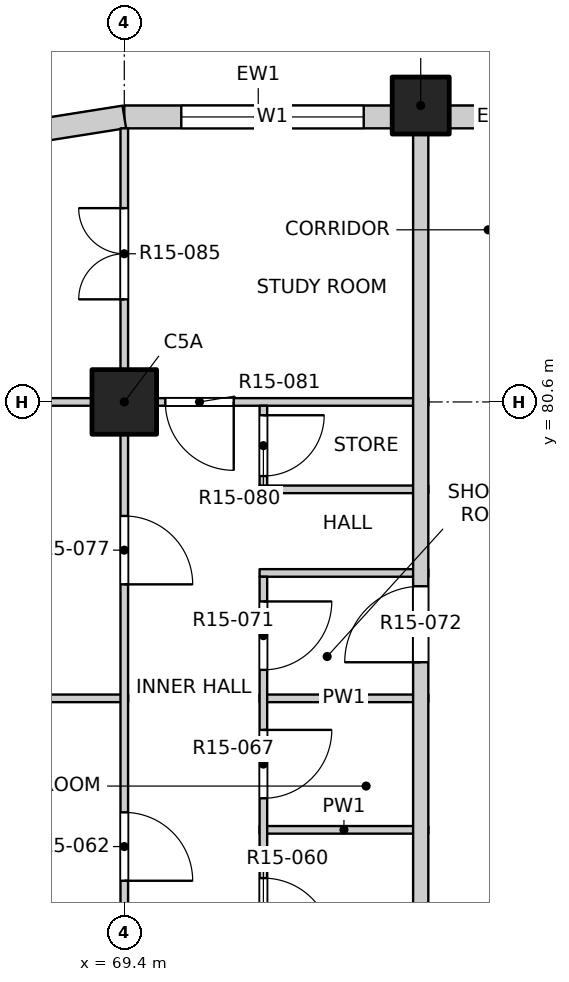
"""IFC4 building model, lengths in metres.
Left out: names, types, materials, properties, quantities, classifications, styles, units other than length and angle.
Written with IfcOpenShell. Run it as: python <this file> out.ifc"""

import sys

from ifc_helpers import new_model, si_unit, direction, frame, frame_2d, origin, origin_2d, place, context, subcontext, project, spatial, rectangle, extrude, element, fill, save


model = new_model("IFC4")
c1 = context("Model", 3, precision=1e-05, world=origin(), true_north=direction((0.0, 1.0)))
c2 = subcontext(c1, "Body", "Model", "MODEL_VIEW")
j1 = project(units=[si_unit("LENGTHUNIT", "METRE"), si_unit("PLANEANGLEUNIT", "RADIAN")], contexts=[c1])
p1 = place(None, origin())
s1 = spatial("IfcSite", under=j1, at=p1, CompositionType="ELEMENT")
p2 = place(p1, origin())
s2 = spatial("IfcBuilding", under=s1, at=p2, CompositionType="ELEMENT")
p3 = place(p2, frame((0.0, 0.0, 158.8)))
s3 = spatial("IfcBuildingStorey", under=s2, at=p3, CompositionType="ELEMENT", Elevation=158.8)
p4 = place(p3, frame((73.3, 84.5, -0.25), z_axis=(0.0, 0.0, 1.0), x_axis=(1.0, 0.0, 0.0)))
e1 = element("IfcColumn", 1, at=p4, inside=s3, PredefinedType="COLUMN", context=c2, shape_type="SweptSolid", body=[
    extrude(rectangle(XDim=0.75, YDim=0.75, at=origin_2d()), origin(), (0.0, 0.0, 1.0), 3.4),
])
p5 = place(p3, frame((69.4, 80.6, -0.25), z_axis=(0.0, 0.0, 1.0), x_axis=(1.0, 0.0, 0.0)))
e2 = element("IfcColumn", 2, at=p5, inside=s3, PredefinedType="COLUMN", context=c2, shape_type="SweptSolid", body=[
    extrude(rectangle(XDim=0.85, YDim=0.85, at=origin_2d()), origin(), (0.0, 0.0, 1.0), 3.4),
])
p6 = place(p3, frame((69.4, 84.35, 0.0), z_axis=(0.0, 0.0, 1.0), x_axis=(1.0, 0.0, 0.0)))
e3 = element("IfcWall", 3, at=p6, inside=s3, PredefinedType="SOLIDWALL", context=c2, shape_type="SweptSolid", body=[
    extrude(rectangle(XDim=3.525, YDim=0.3, at=frame_2d((1.763, 0.0))), origin(), (0.0, 0.0, 1.0), 2.7),
])
p7 = place(p6, frame((0.75, 0.0, 0.9)))
e4 = element("IfcOpeningElement", 4, at=p7, cuts=e3, PredefinedType="OPENING", context=c2, shape_type="SweptSolid", body=[
    extrude(rectangle(XDim=2.4, YDim=1.8, at=frame_2d((1.2, 0.9))), frame((0.0, 0.16, 0.0), z_axis=(0.0, -1.0, 0.0), x_axis=(1.0, 0.0, 0.0)), (0.0, 0.0, 1.0), 0.32),
])
p8 = place(p3, frame((73.675, 84.35, 0.0), z_axis=(0.0, 0.0, 1.0), x_axis=(1.0, 0.0, 0.0)))
e5 = element("IfcWall", 5, at=p8, inside=s3, PredefinedType="SOLIDWALL", context=c2, shape_type="SweptSolid", body=[
    extrude(rectangle(XDim=1.3, YDim=0.3, at=frame_2d((0.65, 0.0))), origin(), (0.0, 0.0, 1.0), 2.7),
])
p9 = place(p3, frame((69.4, 84.35, 0.0), z_axis=(0.0, 0.0, 1.0), x_axis=(-0.987678452879, -0.156496880861, 0.0)))
e6 = element("IfcWall", 6, at=p9, inside=s3, PredefinedType="SOLIDWALL", context=c2, shape_type="SweptSolid", body=[
    extrude(rectangle(XDim=1.173, YDim=0.3, at=frame_2d((0.586, 0.0))), origin(), (0.0, 0.0, 1.0), 2.7),
])
p10 = place(p3, frame((71.18, 74.97, 0.0), z_axis=(0.0, 0.0, 1.0), x_axis=(1.0, 0.0, 0.0)))
e7 = element("IfcWall", 7, at=p10, inside=s3, PredefinedType="PARTITIONING", context=c2, shape_type="SweptSolid", body=[
    extrude(rectangle(XDim=2.22, YDim=0.1, at=frame_2d((1.11, 0.0))), origin(), (0.0, 0.0, 1.0), 3.15),
])
p11 = place(p3, frame((65.8, 76.7, 0.0), z_axis=(0.0, 0.0, 1.0), x_axis=(1.0, 0.0, 0.0)))
e8 = element("IfcWall", 8, at=p11, inside=s3, PredefinedType="PARTITIONING", context=c2, shape_type="SweptSolid", body=[
    extrude(rectangle(XDim=3.65, YDim=0.1, at=frame_2d((1.825, 0.0))), origin(), (0.0, 0.0, 1.0), 2.55),
])
p12 = place(p3, frame((71.18, 76.7, 0.0), z_axis=(0.0, 0.0, 1.0), x_axis=(1.0, 0.0, 0.0)))
e9 = element("IfcWall", 9, at=p12, inside=s3, PredefinedType="PARTITIONING", context=c2, shape_type="SweptSolid", body=[
    extrude(rectangle(XDim=2.22, YDim=0.1, at=frame_2d((1.11, 0.0))), origin(), (0.0, 0.0, 1.0), 2.55),
])
for number, where, z_axis, x_axis in (
    (10, (71.18, 78.35, 0.0), (0.0, 0.0, 1.0), (1.0, 0.0, 0.0)),
    (11, (71.18, 79.45, 0.0), (0.0, 0.0, 1.0), (1.0, 0.0, 0.0)),
):
    element("IfcWall", number, at=place(p3, frame(where, z_axis=z_axis, x_axis=x_axis)), inside=s3, PredefinedType="PARTITIONING", context=c2, shape_type="SweptSolid", body=[
        extrude(rectangle(XDim=2.22, YDim=0.1, at=frame_2d((1.11, 0.0))), origin(), (0.0, 0.0, 1.0), 3.15),
    ])
p13 = place(p3, frame((65.8, 80.6, 0.0), z_axis=(0.0, 0.0, 1.0), x_axis=(1.0, 0.0, 0.0)))
e12 = element("IfcWall", 12, at=p13, inside=s3, PredefinedType="PARTITIONING", context=c2, shape_type="SweptSolid", body=[
    extrude(rectangle(XDim=7.6, YDim=0.1, at=frame_2d((3.8, 0.0))), origin(), (0.0, 0.0, 1.0), 3.15),
])
p14 = place(p13, frame((4.14, 0.0, 0.0)))
e13 = element("IfcOpeningElement", 13, at=p14, cuts=e12, PredefinedType="OPENING", context=c2, shape_type="SweptSolid", body=[
    extrude(rectangle(XDim=0.9, YDim=2.1, at=frame_2d((0.45, 1.05))), frame((0.0, 0.06, 0.0), z_axis=(0.0, -1.0, 0.0), x_axis=(1.0, 0.0, 0.0)), (0.0, 0.0, 1.0), 0.12),
])
p15 = place(p3, frame((69.4, 45.8, 0.0), z_axis=(0.0, 0.0, 1.0), x_axis=(0.0, 1.0, 0.0)))
e14 = element("IfcWall", 14, at=p15, inside=s3, PredefinedType="PARTITIONING", context=c2, shape_type="SweptSolid", body=[
    extrude(rectangle(XDim=38.4, YDim=0.1, at=frame_2d((19.2, 0.0))), origin(), (0.0, 0.0, 1.0), 3.15),
])
p16 = place(p15, frame((1.05, 0.0, 0.0)))
e15 = element("IfcOpeningElement", 15, at=p16, cuts=e14, PredefinedType="OPENING", context=c2, shape_type="SweptSolid", body=[
    extrude(rectangle(XDim=1.2, YDim=2.1, at=frame_2d((0.6, 1.05))), frame((0.0, 0.06, 0.0), z_axis=(0.0, -1.0, 0.0), x_axis=(1.0, 0.0, 0.0)), (0.0, 0.0, 1.0), 0.12),
])
p17 = place(p15, frame((5.1, 0.0, 0.0)))
e16 = element("IfcOpeningElement", 16, at=p17, cuts=e14, PredefinedType="OPENING", context=c2, shape_type="SweptSolid", body=[
    extrude(rectangle(XDim=0.9, YDim=2.1, at=frame_2d((0.45, 1.05))), frame((0.0, 0.06, 0.0), z_axis=(0.0, -1.0, 0.0), x_axis=(1.0, 0.0, 0.0)), (0.0, 0.0, 1.0), 0.12),
])
p18 = place(p15, frame((11.925, 0.0, 0.0)))
e17 = element("IfcOpeningElement", 17, at=p18, cuts=e14, PredefinedType="OPENING", context=c2, shape_type="SweptSolid", body=[
    extrude(rectangle(XDim=1.2, YDim=2.1, at=frame_2d((0.6, 1.05))), frame((0.0, 0.06, 0.0), z_axis=(0.0, -1.0, 0.0), x_axis=(1.0, 0.0, 0.0)), (0.0, 0.0, 1.0), 0.12),
])
p19 = place(p15, frame((16.8, 0.0, 0.0)))
e18 = element("IfcOpeningElement", 18, at=p19, cuts=e14, PredefinedType="OPENING", context=c2, shape_type="SweptSolid", body=[
    extrude(rectangle(XDim=0.9, YDim=2.1, at=frame_2d((0.45, 1.05))), frame((0.0, 0.06, 0.0), z_axis=(0.0, -1.0, 0.0), x_axis=(1.0, 0.0, 0.0)), (0.0, 0.0, 1.0), 0.12),
])
p20 = place(p15, frame((22.5, 0.0, 0.0)))
e19 = element("IfcOpeningElement", 19, at=p20, cuts=e14, PredefinedType="OPENING", context=c2, shape_type="SweptSolid", body=[
    extrude(rectangle(XDim=1.2, YDim=2.1, at=frame_2d((0.6, 1.05))), frame((0.0, 0.06, 0.0), z_axis=(0.0, -1.0, 0.0), x_axis=(1.0, 0.0, 0.0)), (0.0, 0.0, 1.0), 0.12),
])
p21 = place(p15, frame((28.5, 0.0, 0.0)))
e20 = element("IfcOpeningElement", 20, at=p21, cuts=e14, PredefinedType="OPENING", context=c2, shape_type="SweptSolid", body=[
    extrude(rectangle(XDim=0.9, YDim=2.1, at=frame_2d((0.45, 1.05))), frame((0.0, 0.06, 0.0), z_axis=(0.0, -1.0, 0.0), x_axis=(1.0, 0.0, 0.0)), (0.0, 0.0, 1.0), 0.12),
])
p22 = place(p15, frame((32.4, 0.0, 0.0)))
e21 = element("IfcOpeningElement", 21, at=p22, cuts=e14, PredefinedType="OPENING", context=c2, shape_type="SweptSolid", body=[
    extrude(rectangle(XDim=0.9, YDim=2.1, at=frame_2d((0.45, 1.05))), frame((0.0, 0.06, 0.0), z_axis=(0.0, -1.0, 0.0), x_axis=(1.0, 0.0, 0.0)), (0.0, 0.0, 1.0), 0.12),
])
p23 = place(p15, frame((36.15, 0.0, 0.0)))
e22 = element("IfcOpeningElement", 22, at=p23, cuts=e14, PredefinedType="OPENING", context=c2, shape_type="SweptSolid", body=[
    extrude(rectangle(XDim=1.2, YDim=2.1, at=frame_2d((0.6, 1.05))), frame((0.0, 0.06, 0.0), z_axis=(0.0, -1.0, 0.0), x_axis=(1.0, 0.0, 0.0)), (0.0, 0.0, 1.0), 0.12),
])
p24 = place(p3, frame((71.23, 68.45, 0.0), z_axis=(0.0, 0.0, 1.0), x_axis=(0.0, 1.0, 0.0)))
e23 = element("IfcWall", 23, at=p24, inside=s3, PredefinedType="PARTITIONING", context=c2, shape_type="SweptSolid", body=[
    extrude(rectangle(XDim=9.85, YDim=0.1, at=frame_2d((4.925, 0.0))), origin(), (0.0, 0.0, 1.0), 3.15),
])
p25 = place(p24, frame((0.625, 0.0, 0.0)))
e24 = element("IfcOpeningElement", 24, at=p25, cuts=e23, PredefinedType="OPENING", context=c2, shape_type="SweptSolid", body=[
    extrude(rectangle(XDim=0.9, YDim=2.1, at=frame_2d((0.45, 1.05))), frame((0.0, 0.06, 0.0), z_axis=(0.0, -1.0, 0.0), x_axis=(1.0, 0.0, 0.0)), (0.0, 0.0, 1.0), 0.12),
])
p26 = place(p24, frame((2.875, 0.0, 0.0)))
e25 = element("IfcOpeningElement", 25, at=p26, cuts=e23, PredefinedType="OPENING", context=c2, shape_type="SweptSolid", body=[
    extrude(rectangle(XDim=0.8, YDim=2.1, at=frame_2d((0.4, 1.05))), frame((0.0, 0.06, 0.0), z_axis=(0.0, -1.0, 0.0), x_axis=(1.0, 0.0, 0.0)), (0.0, 0.0, 1.0), 0.12),
])
p27 = place(p24, frame((4.985, 0.0, 0.0)))
e26 = element("IfcOpeningElement", 26, at=p27, cuts=e23, PredefinedType="OPENING", context=c2, shape_type="SweptSolid", body=[
    extrude(rectangle(XDim=0.9, YDim=2.1, at=frame_2d((0.45, 1.05))), frame((0.0, 0.06, 0.0), z_axis=(0.0, -1.0, 0.0), x_axis=(1.0, 0.0, 0.0)), (0.0, 0.0, 1.0), 0.12),
])
p28 = place(p24, frame((6.935, 0.0, 0.0)))
e27 = element("IfcOpeningElement", 27, at=p28, cuts=e23, PredefinedType="OPENING", context=c2, shape_type="SweptSolid", body=[
    extrude(rectangle(XDim=0.9, YDim=2.1, at=frame_2d((0.45, 1.05))), frame((0.0, 0.06, 0.0), z_axis=(0.0, -1.0, 0.0), x_axis=(1.0, 0.0, 0.0)), (0.0, 0.0, 1.0), 0.12),
])
p29 = place(p24, frame((8.625, 0.0, 0.0)))
e28 = element("IfcOpeningElement", 28, at=p29, cuts=e23, PredefinedType="OPENING", context=c2, shape_type="SweptSolid", body=[
    extrude(rectangle(XDim=0.9, YDim=2.1, at=frame_2d((0.45, 1.05))), frame((0.0, 0.06, 0.0), z_axis=(0.0, -1.0, 0.0), x_axis=(1.0, 0.0, 0.0)), (0.0, 0.0, 1.0), 0.12),
])
p30 = place(p3, frame((71.23, 79.5, 0.0), z_axis=(0.0, 0.0, 1.0), x_axis=(0.0, 1.0, 0.0)))
e29 = element("IfcWall", 29, at=p30, inside=s3, PredefinedType="PARTITIONING", context=c2, shape_type="SweptSolid", body=[
    extrude(rectangle(XDim=1.05, YDim=0.1, at=frame_2d((0.525, 0.0))), origin(), (0.0, 0.0, 1.0), 3.15),
])
p31 = place(p30, frame((0.125, 0.0, 0.0)))
e30 = element("IfcOpeningElement", 30, at=p31, cuts=e29, PredefinedType="OPENING", context=c2, shape_type="SweptSolid", body=[
    extrude(rectangle(XDim=0.8, YDim=2.1, at=frame_2d((0.4, 1.05))), frame((0.0, 0.06, 0.0), z_axis=(0.0, -1.0, 0.0), x_axis=(1.0, 0.0, 0.0)), (0.0, 0.0, 1.0), 0.12),
])
p32 = place(p3, frame((73.3, 49.5, 0.0), z_axis=(0.0, 0.0, 1.0), x_axis=(0.0, 1.0, 0.0)))
e31 = element("IfcWall", 31, at=p32, inside=s3, PredefinedType="PARTITIONING", context=c2, shape_type="SweptSolid", body=[
    extrude(rectangle(XDim=34.7, YDim=0.2, at=frame_2d((17.35, 0.0))), origin(), (0.0, 0.0, 1.0), 3.15),
])
p33 = place(p32, frame((6.975, 0.0, 0.0)))
e32 = element("IfcOpeningElement", 32, at=p33, cuts=e31, PredefinedType="OPENING", context=c2, shape_type="SweptSolid", body=[
    extrude(rectangle(XDim=1.0, YDim=2.1, at=frame_2d((0.5, 1.05))), frame((0.0, 0.11, 0.0), z_axis=(0.0, -1.0, 0.0), x_axis=(1.0, 0.0, 0.0)), (0.0, 0.0, 1.0), 0.22),
])
p34 = place(p32, frame((19.075, 0.0, 0.0)))
e33 = element("IfcOpeningElement", 33, at=p34, cuts=e31, PredefinedType="OPENING", context=c2, shape_type="SweptSolid", body=[
    extrude(rectangle(XDim=1.0, YDim=2.1, at=frame_2d((0.5, 1.05))), frame((0.0, 0.11, 0.0), z_axis=(0.0, -1.0, 0.0), x_axis=(1.0, 0.0, 0.0)), (0.0, 0.0, 1.0), 0.22),
])
p35 = place(p32, frame((27.675, 0.0, 0.0)))
e34 = element("IfcOpeningElement", 34, at=p35, cuts=e31, PredefinedType="OPENING", context=c2, shape_type="SweptSolid", body=[
    extrude(rectangle(XDim=1.0, YDim=2.1, at=frame_2d((0.5, 1.05))), frame((0.0, 0.11, 0.0), z_axis=(0.0, -1.0, 0.0), x_axis=(1.0, 0.0, 0.0)), (0.0, 0.0, 1.0), 0.22),
])
p36 = place(p7, origin())
e35 = element("IfcWindow", 35, at=p36, inside=s3, PartitioningType="DOUBLE_PANEL_VERTICAL", PredefinedType="WINDOW", context=c2, shape_type="SweptSolid", body=[
    extrude(rectangle(XDim=2.4, YDim=1.8, at=frame_2d((1.2, 0.9))), frame((0.0, 0.03, 0.0), z_axis=(0.0, -1.0, 0.0), x_axis=(1.0, 0.0, 0.0)), (0.0, 0.0, 1.0), 0.06),
])
fill(e4, e35)
p37 = place(p27, origin())
e36 = element("IfcDoor", 36, at=p37, inside=s3, OperationType="SINGLE_SWING_RIGHT", PredefinedType="DOOR", context=c2, shape_type="SweptSolid", body=[
    extrude(rectangle(XDim=0.9, YDim=2.1, at=frame_2d((0.45, 1.05))), frame((0.0, 0.025, 0.0), z_axis=(0.0, -1.0, 0.0), x_axis=(1.0, 0.0, 0.0)), (0.0, 0.0, 1.0), 0.05),
])
fill(e26, e36)
p38 = place(p21, origin())
e37 = element("IfcDoor", 37, at=p38, inside=s3, OperationType="SINGLE_SWING_RIGHT", PredefinedType="DOOR", context=c2, shape_type="SweptSolid", body=[
    extrude(rectangle(XDim=0.9, YDim=2.1, at=frame_2d((0.45, 1.05))), frame((0.0, 0.025, 0.0), z_axis=(0.0, -1.0, 0.0), x_axis=(1.0, 0.0, 0.0)), (0.0, 0.0, 1.0), 0.05),
])
fill(e20, e37)
p39 = place(p28, origin())
e38 = element("IfcDoor", 38, at=p39, inside=s3, OperationType="SINGLE_SWING_LEFT", PredefinedType="DOOR", context=c2, shape_type="SweptSolid", body=[
    extrude(rectangle(XDim=0.9, YDim=2.1, at=frame_2d((0.45, 1.05))), frame((0.0, 0.025, 0.0), z_axis=(0.0, -1.0, 0.0), x_axis=(1.0, 0.0, 0.0)), (0.0, 0.0, 1.0), 0.05),
])
fill(e27, e38)
p40 = place(p29, origin())
e39 = element("IfcDoor", 39, at=p40, inside=s3, OperationType="SINGLE_SWING_LEFT", PredefinedType="DOOR", context=c2, shape_type="SweptSolid", body=[
    extrude(rectangle(XDim=0.9, YDim=2.1, at=frame_2d((0.45, 1.05))), frame((0.0, 0.025, 0.0), z_axis=(0.0, -1.0, 0.0), x_axis=(1.0, 0.0, 0.0)), (0.0, 0.0, 1.0), 0.05),
])
fill(e28, e39)
p41 = place(p35, origin())
e40 = element("IfcDoor", 40, at=p41, inside=s3, OperationType="SINGLE_SWING_LEFT", PredefinedType="DOOR", context=c2, shape_type="SweptSolid", body=[
    extrude(rectangle(XDim=1.0, YDim=2.1, at=frame_2d((0.5, 1.05))), frame((0.0, 0.025, 0.0), z_axis=(0.0, -1.0, 0.0), x_axis=(1.0, 0.0, 0.0)), (0.0, 0.0, 1.0), 0.05),
])
fill(e34, e40)
p42 = place(p22, origin())
e41 = element("IfcDoor", 41, at=p42, inside=s3, OperationType="SINGLE_SWING_RIGHT", PredefinedType="DOOR", context=c2, shape_type="SweptSolid", body=[
    extrude(rectangle(XDim=0.9, YDim=2.1, at=frame_2d((0.45, 1.05))), frame((0.0, 0.025, 0.0), z_axis=(0.0, -1.0, 0.0), x_axis=(1.0, 0.0, 0.0)), (0.0, 0.0, 1.0), 0.05),
])
fill(e21, e41)
p43 = place(p31, origin())
e42 = element("IfcDoor", 42, at=p43, inside=s3, OperationType="SINGLE_SWING_LEFT", PredefinedType="DOOR", context=c2, shape_type="SweptSolid", body=[
    extrude(rectangle(XDim=0.8, YDim=2.1, at=frame_2d((0.4, 1.05))), frame((0.0, 0.025, 0.0), z_axis=(0.0, -1.0, 0.0), x_axis=(1.0, 0.0, 0.0)), (0.0, 0.0, 1.0), 0.05),
])
fill(e30, e42)
p44 = place(p14, origin())
e43 = element("IfcDoor", 43, at=p44, inside=s3, OperationType="SINGLE_SWING_LEFT", PredefinedType="DOOR", context=c2, shape_type="SweptSolid", body=[
    extrude(rectangle(XDim=0.9, YDim=2.1, at=frame_2d((0.45, 1.05))), frame((0.0, 0.025, 0.0), z_axis=(0.0, -1.0, 0.0), x_axis=(1.0, 0.0, 0.0)), (0.0, 0.0, 1.0), 0.05),
])
fill(e13, e43)
p45 = place(p23, origin())
e44 = element("IfcDoor", 44, at=p45, inside=s3, OperationType="DOUBLE_DOOR_SINGLE_SWING", PredefinedType="DOOR", context=c2, shape_type="SweptSolid", body=[
    extrude(rectangle(XDim=1.2, YDim=2.1, at=frame_2d((0.6, 1.05))), frame((0.0, 0.025, 0.0), z_axis=(0.0, -1.0, 0.0), x_axis=(1.0, 0.0, 0.0)), (0.0, 0.0, 1.0), 0.05),
])
fill(e22, e44)
save(model, sys.argv[1])
